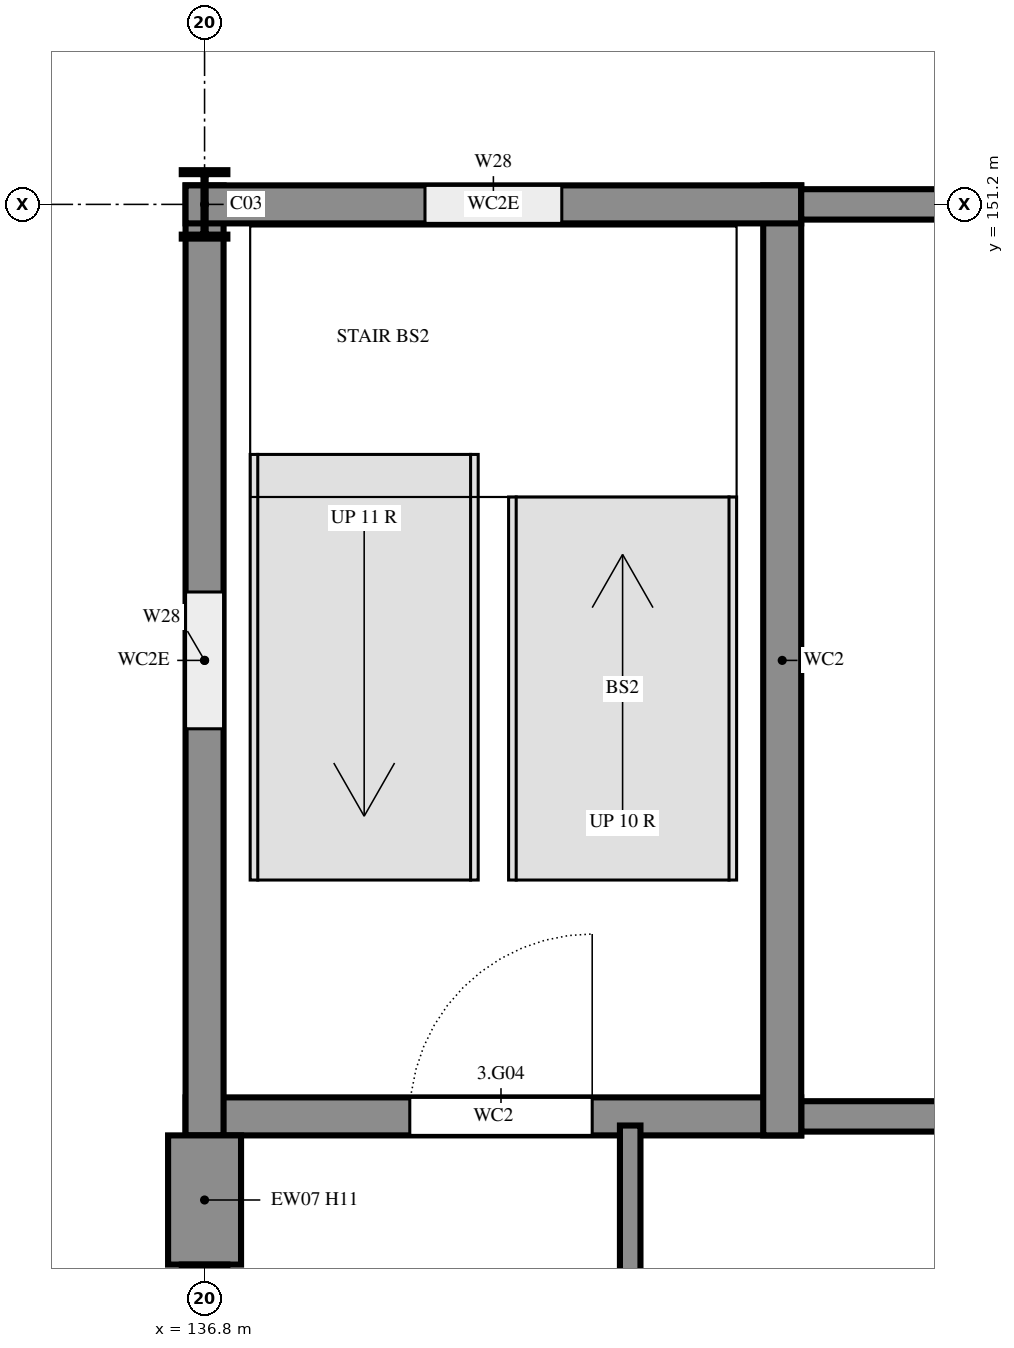
"""IFC4 building model, lengths in metres.
Left out: names, types, materials, properties, quantities, classifications, styles, units other than length and angle.
Written with IfcOpenShell. Run it as: python <this file> out.ifc"""

import sys

from ifc_helpers import new_model, si_unit, direction, frame, frame_2d, origin, origin_2d, place, context, subcontext, project, spatial, rectangle, i_section, extrude, element, fill, save


model = new_model("IFC4")
c1 = context("Model", 3, precision=1e-05, world=origin(), true_north=direction((0.0, 1.0)))
c2 = subcontext(c1, "Body", "Model", "MODEL_VIEW")
j1 = project(units=[si_unit("LENGTHUNIT", "METRE"), si_unit("PLANEANGLEUNIT", "RADIAN")], contexts=[c1])
p1 = place(None, origin())
s1 = spatial("IfcSite", under=j1, at=p1, CompositionType="ELEMENT")
p2 = place(p1, origin())
s2 = spatial("IfcBuilding", under=s1, at=p2, CompositionType="ELEMENT")
p3 = place(p2, frame((0.0, 0.0, 10.8)))
s3 = spatial("IfcBuildingStorey", under=s2, at=p3, CompositionType="ELEMENT", Elevation=10.8)
for number, where, z_axis, x_axis in (
    (1, (136.8, 151.2, 0.0), (0.0, 0.0, 1.0), (1.0, 0.0, 0.0)),
    (2, (136.8, 144.0, 0.0), (0.0, 0.0, 1.0), (1.0, 0.0, 0.0)),
):
    element("IfcColumn", number, at=place(p3, frame(where, z_axis=z_axis, x_axis=x_axis)), inside=s3, PredefinedType="COLUMN", context=c2, shape_type="SweptSolid", body=[
        extrude(i_section(OverallWidth=0.3, OverallDepth=0.45, WebThickness=0.014, FlangeThickness=0.026, FilletRadius=0.027, at=origin_2d()), origin(), (0.0, 0.0, 1.0), 3.6),
    ])
p4 = place(p3, frame((136.675, 145.2, 0.0), z_axis=(0.0, 0.0, 1.0), x_axis=(1.0, 0.0, 0.0)))
e3 = element("IfcWall", 3, at=p4, inside=s3, PredefinedType="SHEAR", context=c2, shape_type="SweptSolid", body=[
    extrude(rectangle(XDim=4.05, YDim=0.25, at=frame_2d((2.025, 0.0))), origin(), (0.0, 0.0, 1.0), 3.6),
])
p5 = place(p4, frame((1.475, 0.0, 0.0)))
e4 = element("IfcOpeningElement", 4, at=p5, cuts=e3, PredefinedType="OPENING", context=c2, shape_type="SweptSolid", body=[
    extrude(rectangle(XDim=1.2, YDim=2.4, at=frame_2d((0.6, 1.2))), frame((0.0, 0.135, 0.0), z_axis=(0.0, -1.0, 0.0), x_axis=(1.0, 0.0, 0.0)), (0.0, 0.0, 1.0), 0.27),
])
p6 = place(p3, frame((140.725, 145.2, 0.0), z_axis=(0.0, 0.0, 1.0), x_axis=(1.0, 0.0, 0.0)))
e5 = element("IfcWall", 5, at=p6, inside=s3, PredefinedType="SHEAR", context=c2, shape_type="SweptSolid", body=[
    extrude(rectangle(XDim=2.375, YDim=0.2, at=frame_2d((1.188, 0.0))), origin(), (0.0, 0.0, 1.0), 3.6),
])
p7 = place(p3, frame((140.6, 145.075, 0.0), z_axis=(0.0, 0.0, 1.0), x_axis=(0.0, 1.0, 0.0)))
e6 = element("IfcWall", 6, at=p7, inside=s3, PredefinedType="SHEAR", context=c2, shape_type="SweptSolid", body=[
    extrude(rectangle(XDim=6.25, YDim=0.25, at=frame_2d((3.125, 0.0))), origin(), (0.0, 0.0, 1.0), 3.6),
])
p8 = place(p3, frame((136.8, 151.325, 0.0), z_axis=(0.0, 0.0, 1.0), x_axis=(0.0, -1.0, 0.0)))
e7 = element("IfcWall", 7, at=p8, inside=s3, PredefinedType="SHEAR", context=c2, shape_type="SweptSolid", body=[
    extrude(rectangle(XDim=6.25, YDim=0.25, at=frame_2d((3.125, 0.0))), origin(), (0.0, 0.0, 1.0), 3.6),
])
p9 = place(p8, frame((2.675, 0.0, 0.6)))
e8 = element("IfcOpeningElement", 8, at=p9, cuts=e7, PredefinedType="OPENING", context=c2, shape_type="SweptSolid", body=[
    extrude(rectangle(XDim=0.9, YDim=2.1, at=frame_2d((0.45, 1.05))), frame((0.0, 0.135, 0.0), z_axis=(0.0, -1.0, 0.0), x_axis=(1.0, 0.0, 0.0)), (0.0, 0.0, 1.0), 0.27),
])
p10 = place(p3, frame((140.725, 151.2, 0.0), z_axis=(0.0, 0.0, 1.0), x_axis=(-1.0, 0.0, 0.0)))
e9 = element("IfcWall", 9, at=p10, inside=s3, PredefinedType="SHEAR", context=c2, shape_type="SweptSolid", body=[
    extrude(rectangle(XDim=4.05, YDim=0.25, at=frame_2d((2.025, 0.0))), origin(), (0.0, 0.0, 1.0), 3.6),
])
p11 = place(p10, frame((1.575, 0.0, 0.6)))
e10 = element("IfcOpeningElement", 10, at=p11, cuts=e9, PredefinedType="OPENING", context=c2, shape_type="SweptSolid", body=[
    extrude(rectangle(XDim=0.9, YDim=2.1, at=frame_2d((0.45, 1.05))), frame((0.0, 0.135, 0.0), z_axis=(0.0, -1.0, 0.0), x_axis=(1.0, 0.0, 0.0)), (0.0, 0.0, 1.0), 0.27),
])
p12 = place(p3, frame((143.1, 151.2, 0.0), z_axis=(0.0, 0.0, 1.0), x_axis=(-1.0, 0.0, 0.0)))
e11 = element("IfcWall", 11, at=p12, inside=s3, PredefinedType="SHEAR", context=c2, shape_type="SweptSolid", body=[
    extrude(rectangle(XDim=2.375, YDim=0.2, at=frame_2d((1.188, 0.0))), origin(), (0.0, 0.0, 1.0), 3.6),
])
p13 = place(p3, frame((136.8, 145.075, 0.0), z_axis=(0.0, 0.0, 1.0), x_axis=(0.0, -1.0, 0.0)))
e12 = element("IfcWall", 12, at=p13, inside=s3, PredefinedType="SOLIDWALL", context=c2, shape_type="SweptSolid", body=[
    extrude(rectangle(XDim=0.85, YDim=0.48, at=frame_2d((0.425, 0.0))), origin(), (0.0, 0.0, 1.0), 3.22),
])
p14 = place(p3, frame((139.6, 145.14, 0.0), z_axis=(0.0, 0.0, 1.0), x_axis=(0.0, -1.0, 0.0)))
e13 = element("IfcWall", 13, at=p14, inside=s3, PredefinedType="PARTITIONING", context=c2, shape_type="SweptSolid", body=[
    extrude(rectangle(XDim=5.002, YDim=0.135, at=frame_2d((2.501, 0.0))), origin(), (0.0, 0.0, 1.0), 3.42),
])
p15 = place(p14, frame((1.75, 0.0, 0.0)))
e14 = element("IfcOpeningElement", 14, at=p15, cuts=e13, PredefinedType="OPENING", context=c2, shape_type="SweptSolid", body=[
    extrude(rectangle(XDim=1.5, YDim=2.1, at=frame_2d((0.75, 1.05))), frame((0.0, 0.077, 0.0), z_axis=(0.0, -1.0, 0.0), x_axis=(1.0, 0.0, 0.0)), (0.0, 0.0, 1.0), 0.155),
])
p16 = place(p11, origin())
e15 = element("IfcWindow", 15, at=p16, inside=s3, PartitioningType="SINGLE_PANEL", PredefinedType="WINDOW", context=c2, shape_type="SweptSolid", body=[
    extrude(rectangle(XDim=0.9, YDim=2.1, at=frame_2d((0.45, 1.05))), frame((0.0, 0.03, 0.0), z_axis=(0.0, -1.0, 0.0), x_axis=(1.0, 0.0, 0.0)), (0.0, 0.0, 1.0), 0.06),
])
fill(e10, e15)
p17 = place(p9, origin())
e16 = element("IfcWindow", 16, at=p17, inside=s3, PartitioningType="SINGLE_PANEL", PredefinedType="WINDOW", context=c2, shape_type="SweptSolid", body=[
    extrude(rectangle(XDim=0.9, YDim=2.1, at=frame_2d((0.45, 1.05))), frame((0.0, 0.03, 0.0), z_axis=(0.0, -1.0, 0.0), x_axis=(1.0, 0.0, 0.0)), (0.0, 0.0, 1.0), 0.06),
])
fill(e8, e16)
p18 = place(p5, origin())
e17 = element("IfcDoor", 17, at=p18, inside=s3, OperationType="SINGLE_SWING_LEFT", PredefinedType="DOOR", context=c2, shape_type="SweptSolid", body=[
    extrude(rectangle(XDim=1.2, YDim=2.4, at=frame_2d((0.6, 1.2))), frame((0.0, 0.025, 0.0), z_axis=(0.0, -1.0, 0.0), x_axis=(1.0, 0.0, 0.0)), (0.0, 0.0, 1.0), 0.05),
])
fill(e4, e17)
save(model, sys.argv[1])
